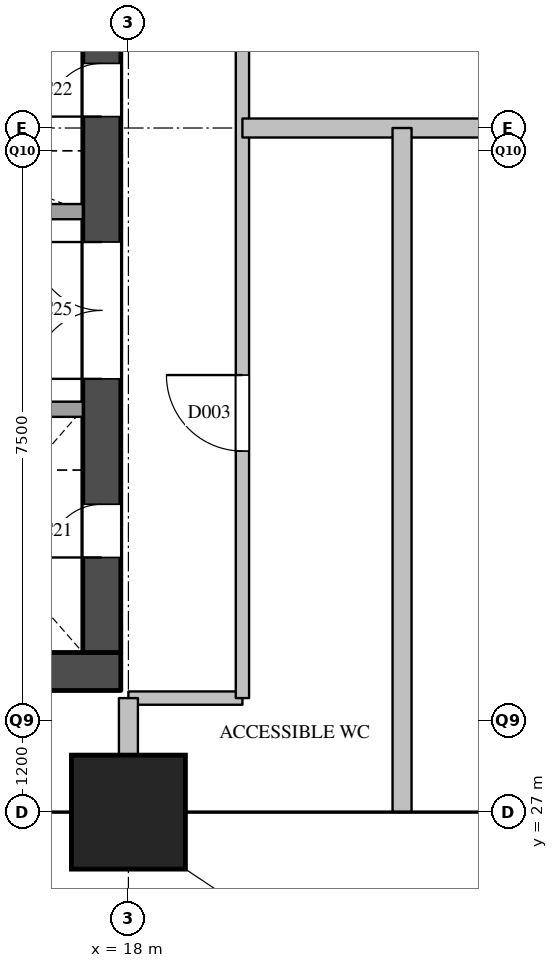
"""IFC4 building model, lengths in metres.
Left out: names, types, materials, properties, quantities, classifications, styles, units other than length and angle.
Written with IfcOpenShell. Run it as: python <this file> out.ifc"""

import sys

from ifc_helpers import new_model, si_unit, direction, frame, frame_2d, origin, origin_2d, place, context, subcontext, project, spatial, rectangle, extrude, element, fill, save


model = new_model("IFC4")
c1 = context("Model", 3, precision=1e-05, world=origin(), true_north=direction((0.0, 1.0)))
c2 = subcontext(c1, "Body", "Model", "MODEL_VIEW")
j1 = project(units=[si_unit("LENGTHUNIT", "METRE"), si_unit("PLANEANGLEUNIT", "RADIAN")], contexts=[c1])
p1 = place(None, origin())
s1 = spatial("IfcSite", under=j1, at=p1, CompositionType="ELEMENT")
p2 = place(p1, origin())
s2 = spatial("IfcBuilding", under=s1, at=p2, CompositionType="ELEMENT")
p3 = place(p2, frame((0.0, 0.0, 166.1)))
s3 = spatial("IfcBuildingStorey", under=s2, at=p3, CompositionType="ELEMENT", Elevation=166.1)
p4 = place(p3, frame((18.0, 27.0, 0.0), z_axis=(0.0, 0.0, 1.0), x_axis=(1.0, 0.0, 0.0)))
e1 = element("IfcColumn", 1, at=p4, inside=s3, PredefinedType="COLUMN", context=c2, shape_type="SweptSolid", body=[
    extrude(rectangle(XDim=1.5, YDim=1.5, at=origin_2d()), origin(), (0.0, 0.0, 1.0), 3.9),
])
p5 = place(p3, frame((5.7, 28.85, 0.0), z_axis=(0.0, 0.0, 1.0), x_axis=(1.0, 0.0, 0.0)))
e2 = element("IfcWall", 2, at=p5, inside=s3, PredefinedType="SHEAR", context=c2, shape_type="SweptSolid", body=[
    extrude(rectangle(XDim=12.2, YDim=0.5, at=frame_2d((6.1, 0.0))), origin(), (0.0, 0.0, 1.0), 3.6),
])
p6 = place(p5, frame((9.35, 0.0, 0.0)))
e3 = element("IfcOpeningElement", 3, at=p6, cuts=e2, PredefinedType="OPENING", context=c2, shape_type="SweptSolid", body=[
    extrude(rectangle(XDim=1.2, YDim=2.1, at=frame_2d((0.6, 1.05))), frame((0.0, 0.26, 0.0), z_axis=(0.0, -1.0, 0.0), x_axis=(1.0, 0.0, 0.0)), (0.0, 0.0, 1.0), 0.52),
])
p7 = place(p3, frame((17.65, 29.1, 0.0), z_axis=(0.0, 0.0, 1.0), x_axis=(0.0, 1.0, 0.0)))
e4 = element("IfcWall", 4, at=p7, inside=s3, PredefinedType="SHEAR", context=c2, shape_type="SweptSolid", body=[
    extrude(rectangle(XDim=20.3, YDim=0.5, at=frame_2d((10.15, 0.0))), origin(), (0.0, 0.0, 1.0), 3.6),
])
p8 = place(p7, frame((1.25, 0.0, 0.0)))
e5 = element("IfcOpeningElement", 5, at=p8, cuts=e4, PredefinedType="OPENING", context=c2, shape_type="SweptSolid", body=[
    extrude(rectangle(XDim=0.7, YDim=2.1, at=frame_2d((0.35, 1.05))), frame((0.0, 0.26, 0.0), z_axis=(0.0, -1.0, 0.0), x_axis=(1.0, 0.0, 0.0)), (0.0, 0.0, 1.0), 0.52),
])
p9 = place(p7, frame((7.05, 0.0, 0.0)))
e6 = element("IfcOpeningElement", 6, at=p9, cuts=e4, PredefinedType="OPENING", context=c2, shape_type="SweptSolid", body=[
    extrude(rectangle(XDim=0.7, YDim=2.1, at=frame_2d((0.35, 1.05))), frame((0.0, 0.26, 0.0), z_axis=(0.0, -1.0, 0.0), x_axis=(1.0, 0.0, 0.0)), (0.0, 0.0, 1.0), 0.52),
])
p10 = place(p7, frame((3.6, 0.0, 0.0)))
e7 = element("IfcOpeningElement", 7, at=p10, cuts=e4, PredefinedType="OPENING", context=c2, shape_type="SweptSolid", body=[
    extrude(rectangle(XDim=1.8, YDim=2.1, at=frame_2d((0.9, 1.05))), frame((0.0, 0.26, 0.0), z_axis=(0.0, -1.0, 0.0), x_axis=(1.0, 0.0, 0.0)), (0.0, 0.0, 1.0), 0.52),
])
for number, where, z_axis, x_axis in (
    (8, (14.6, 32.3, 0.0), (0.0, 0.0, 1.0), (1.0, 0.0, 0.0)),
    (9, (14.6, 34.9, 0.0), (0.0, 0.0, 1.0), (1.0, 0.0, 0.0)),
):
    element("IfcWall", number, at=place(p3, frame(where, z_axis=z_axis, x_axis=x_axis)), inside=s3, PredefinedType="SOLIDWALL", context=c2, shape_type="SweptSolid", body=[
        extrude(rectangle(XDim=2.8, YDim=0.2, at=frame_2d((1.4, 0.0))), origin(), (0.0, 0.0, 1.0), 3.6),
    ])
p11 = place(p3, frame((18.0, 28.5, 0.0), z_axis=(0.0, 0.0, 1.0), x_axis=(1.0, 0.0, 0.0)))
e10 = element("IfcWall", 10, at=p11, inside=s3, PredefinedType="PARTITIONING", context=c2, shape_type="SweptSolid", body=[
    extrude(rectangle(XDim=1.5, YDim=0.175, at=frame_2d((0.75, 0.0))), origin(), (0.0, 0.0, 1.0), 3.6),
])
p12 = place(p3, frame((19.5, 28.5, 0.0), z_axis=(0.0, 0.0, 1.0), x_axis=(0.0, 1.0, 0.0)))
e11 = element("IfcWall", 11, at=p12, inside=s3, PredefinedType="PARTITIONING", context=c2, shape_type="SweptSolid", body=[
    extrude(rectangle(XDim=23.0, YDim=0.175, at=frame_2d((11.5, 0.0))), origin(), (0.0, 0.0, 1.0), 3.6),
])
p13 = place(p12, frame((3.25, 0.0, 0.0)))
e12 = element("IfcOpeningElement", 12, at=p13, cuts=e11, PredefinedType="OPENING", context=c2, shape_type="SweptSolid", body=[
    extrude(rectangle(XDim=1.0, YDim=2.1, at=frame_2d((0.5, 1.05))), frame((0.0, 0.097, 0.0), z_axis=(0.0, -1.0, 0.0), x_axis=(1.0, 0.0, 0.0)), (0.0, 0.0, 1.0), 0.195),
])
p14 = place(p12, frame((10.6, 0.0, 0.0)))
e13 = element("IfcOpeningElement", 13, at=p14, cuts=e11, PredefinedType="OPENING", context=c2, shape_type="SweptSolid", body=[
    extrude(rectangle(XDim=1.0, YDim=2.1, at=frame_2d((0.5, 1.05))), frame((0.0, 0.097, 0.0), z_axis=(0.0, -1.0, 0.0), x_axis=(1.0, 0.0, 0.0)), (0.0, 0.0, 1.0), 0.195),
])
p15 = place(p12, frame((15.1, 0.0, 0.0)))
e14 = element("IfcOpeningElement", 14, at=p15, cuts=e11, PredefinedType="OPENING", context=c2, shape_type="SweptSolid", body=[
    extrude(rectangle(XDim=1.0, YDim=2.1, at=frame_2d((0.5, 1.05))), frame((0.0, 0.097, 0.0), z_axis=(0.0, -1.0, 0.0), x_axis=(1.0, 0.0, 0.0)), (0.0, 0.0, 1.0), 0.195),
])
p16 = place(p12, frame((20.2, 0.0, 0.0)))
e15 = element("IfcOpeningElement", 15, at=p16, cuts=e11, PredefinedType="OPENING", context=c2, shape_type="SweptSolid", body=[
    extrude(rectangle(XDim=0.9, YDim=2.1, at=frame_2d((0.45, 1.05))), frame((0.0, 0.097, 0.0), z_axis=(0.0, -1.0, 0.0), x_axis=(1.0, 0.0, 0.0)), (0.0, 0.0, 1.0), 0.195),
])
p17 = place(p3, frame((19.5, 36.0, 0.0), z_axis=(0.0, 0.0, 1.0), x_axis=(1.0, 0.0, 0.0)))
e16 = element("IfcWall", 16, at=p17, inside=s3, PredefinedType="PARTITIONING", context=c2, shape_type="SweptSolid", body=[
    extrude(rectangle(XDim=15.0, YDim=0.25, at=frame_2d((7.5, 0.0))), origin(), (0.0, 0.0, 1.0), 3.6),
])
p18 = place(p3, frame((18.0, 27.0, 0.0), z_axis=(0.0, 0.0, 1.0), x_axis=(0.0, 1.0, 0.0)))
e17 = element("IfcWall", 17, at=p18, inside=s3, PredefinedType="PARTITIONING", context=c2, shape_type="SweptSolid", body=[
    extrude(rectangle(XDim=1.5, YDim=0.25, at=frame_2d((0.75, 0.0))), origin(), (0.0, 0.0, 1.0), 3.6),
])
p19 = place(p3, frame((21.6, 27.0, 0.0), z_axis=(0.0, 0.0, 1.0), x_axis=(0.0, 1.0, 0.0)))
e18 = element("IfcWall", 18, at=p19, inside=s3, PredefinedType="PARTITIONING", context=c2, shape_type="SweptSolid", body=[
    extrude(rectangle(XDim=9.0, YDim=0.25, at=frame_2d((4.5, 0.0))), origin(), (0.0, 0.0, 1.0), 2.6),
])
p20 = place(p8, origin())
e19 = element("IfcDoor", 19, at=p20, inside=s3, OperationType="SINGLE_SWING_LEFT", PredefinedType="DOOR", context=c2, shape_type="SweptSolid", body=[
    extrude(rectangle(XDim=0.7, YDim=2.1, at=frame_2d((0.35, 1.05))), frame((0.0, 0.025, 0.0), z_axis=(0.0, -1.0, 0.0), x_axis=(1.0, 0.0, 0.0)), (0.0, 0.0, 1.0), 0.05),
])
fill(e5, e19)
p21 = place(p9, origin())
e20 = element("IfcDoor", 20, at=p21, inside=s3, OperationType="SINGLE_SWING_LEFT", PredefinedType="DOOR", context=c2, shape_type="SweptSolid", body=[
    extrude(rectangle(XDim=0.7, YDim=2.1, at=frame_2d((0.35, 1.05))), frame((0.0, 0.025, 0.0), z_axis=(0.0, -1.0, 0.0), x_axis=(1.0, 0.0, 0.0)), (0.0, 0.0, 1.0), 0.05),
])
fill(e6, e20)
p22 = place(p10, origin())
e21 = element("IfcDoor", 21, at=p22, inside=s3, OperationType="DOUBLE_DOOR_SINGLE_SWING", PredefinedType="DOOR", context=c2, shape_type="SweptSolid", body=[
    extrude(rectangle(XDim=1.8, YDim=2.1, at=frame_2d((0.9, 1.05))), frame((0.0, 0.025, 0.0), z_axis=(0.0, -1.0, 0.0), x_axis=(1.0, 0.0, 0.0)), (0.0, 0.0, 1.0), 0.05),
])
fill(e7, e21)
p23 = place(p13, origin())
e22 = element("IfcDoor", 22, at=p23, inside=s3, OperationType="SINGLE_SWING_RIGHT", PredefinedType="DOOR", context=c2, shape_type="SweptSolid", body=[
    extrude(rectangle(XDim=1.0, YDim=2.1, at=frame_2d((0.5, 1.05))), frame((0.0, 0.025, 0.0), z_axis=(0.0, -1.0, 0.0), x_axis=(1.0, 0.0, 0.0)), (0.0, 0.0, 1.0), 0.05),
])
fill(e12, e22)
save(model, sys.argv[1])
